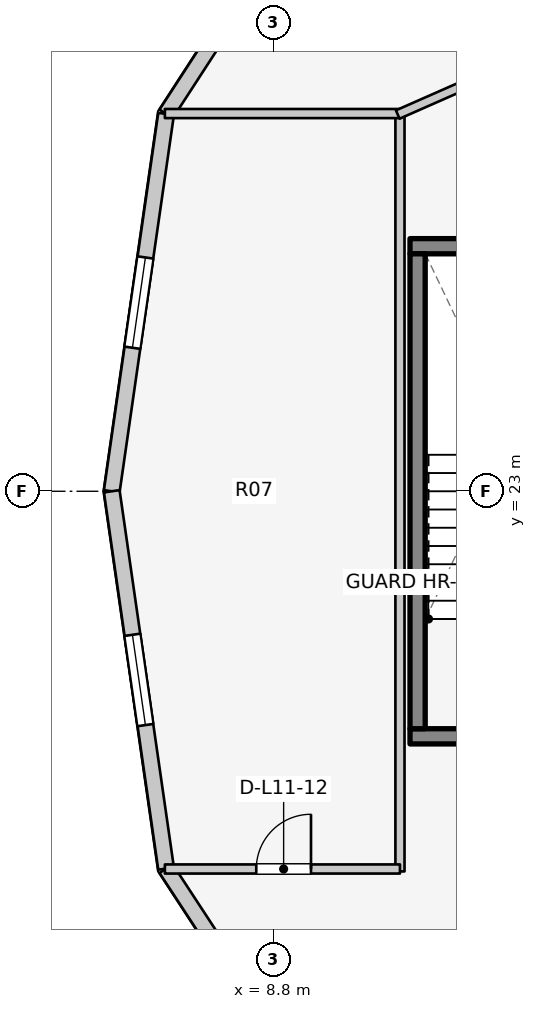
"""IFC4 building model, lengths in metres.
Left out: names, types, materials, properties, quantities, classifications, styles, units other than length and angle.
Written with IfcOpenShell. Run it as: python <this file> out.ifc"""

import sys

from ifc_helpers import new_model, si_unit, direction, frame, frame_2d, origin, place, context, subcontext, project, spatial, rectangle, extrude, element, fill, save


model = new_model("IFC4")
c1 = context("Model", 3, precision=1e-05, world=origin(), true_north=direction((0.0, 1.0)))
c2 = subcontext(c1, "Body", "Model", "MODEL_VIEW")
j1 = project(units=[si_unit("LENGTHUNIT", "METRE"), si_unit("PLANEANGLEUNIT", "RADIAN")], contexts=[c1])
p1 = place(None, origin())
s1 = spatial("IfcSite", under=j1, at=p1, CompositionType="ELEMENT")
p2 = place(p1, origin())
s2 = spatial("IfcBuilding", under=s1, at=p2, CompositionType="ELEMENT")
p3 = place(p2, frame((0.0, 0.0, 40.0)))
s3 = spatial("IfcBuildingStorey", under=s2, at=p3, CompositionType="ELEMENT", Elevation=40.0)
p4 = place(p3, frame((11.045, 18.97, 0.0), z_axis=(0.0, 0.0, 1.0), x_axis=(1.0, 0.0, 0.0)))
e1 = element("IfcWall", 1, at=p4, inside=s3, PredefinedType="SOLIDWALL", context=c2, shape_type="SweptSolid", body=[
    extrude(rectangle(XDim=3.782, YDim=0.25, at=frame_2d((1.891, 0.0))), origin(), (0.0, 0.0, 1.0), 3.1),
])
p5 = place(p4, frame((1.135, 0.0, 0.0)))
e2 = element("IfcOpeningElement", 2, at=p5, cuts=e1, PredefinedType="OPENING", context=c2, shape_type="SweptSolid", body=[
    extrude(rectangle(XDim=1.1, YDim=2.1, at=frame_2d((0.55, 1.05))), frame((0.0, 0.135, 0.0), z_axis=(0.0, -1.0, 0.0), x_axis=(1.0, 0.0, 0.0)), (0.0, 0.0, 1.0), 0.27),
])
p6 = place(p3, frame((11.045, 27.03, 0.0), z_axis=(0.0, 0.0, 1.0), x_axis=(1.0, 0.0, 0.0)))
e3 = element("IfcWall", 3, at=p6, inside=s3, PredefinedType="SOLIDWALL", context=c2, shape_type="SweptSolid", body=[
    extrude(rectangle(XDim=3.782, YDim=0.25, at=frame_2d((1.891, 0.0))), origin(), (0.0, 0.0, 1.0), 3.1),
])
p7 = place(p3, frame((11.17, 19.095, 0.0), z_axis=(0.0, 0.0, 1.0), x_axis=(0.0, 1.0, 0.0)))
e4 = element("IfcWall", 4, at=p7, inside=s3, PredefinedType="SOLIDWALL", context=c2, shape_type="SweptSolid", body=[
    extrude(rectangle(XDim=7.81, YDim=0.25, at=frame_2d((3.905, 0.0))), origin(), (0.0, 0.0, 1.0), 3.1),
])
p8 = place(p3, frame((9.806, 33.476, 0.0), z_axis=(0.0, 0.0, 1.0), x_axis=(-0.544578722263, -0.838709732421, 0.0)))
e5 = element("IfcWall", 5, at=p8, inside=s3, PredefinedType="STANDARD", context=c2, shape_type="SweptSolid", body=[
    extrude(rectangle(XDim=5.092, YDim=0.26, at=frame_2d((2.546, 0.0))), origin(), (0.0, 0.0, 1.0), 2.85),
])
p9 = place(p8, frame((1.346, 0.0, 0.75)))
e6 = element("IfcOpeningElement", 6, at=p9, cuts=e5, PredefinedType="OPENING", context=c2, shape_type="SweptSolid", body=[
    extrude(rectangle(XDim=2.4, YDim=1.7, at=frame_2d((1.2, 0.85))), frame((0.0, 0.14, 0.0), z_axis=(0.0, -1.0, 0.0), x_axis=(1.0, 0.0, 0.0)), (0.0, 0.0, 1.0), 0.28),
])
p10 = place(p3, frame((7.033, 29.205, 0.0), z_axis=(0.0, 0.0, 1.0), x_axis=(-0.142528001686, -0.989790770181, 0.0)))
e7 = element("IfcWall", 7, at=p10, inside=s3, PredefinedType="STANDARD", context=c2, shape_type="SweptSolid", body=[
    extrude(rectangle(XDim=6.269, YDim=0.26, at=frame_2d((3.135, 0.0))), origin(), (0.0, 0.0, 1.0), 2.85),
])
p11 = place(p10, frame((2.385, 0.0, 0.75)))
e8 = element("IfcOpeningElement", 8, at=p11, cuts=e7, PredefinedType="OPENING", context=c2, shape_type="SweptSolid", body=[
    extrude(rectangle(XDim=1.5, YDim=1.6, at=frame_2d((0.75, 0.8))), frame((0.0, 0.14, 0.0), z_axis=(0.0, -1.0, 0.0), x_axis=(1.0, 0.0, 0.0)), (0.0, 0.0, 1.0), 0.28),
])
p12 = place(p3, frame((6.14, 23.0, 0.0), z_axis=(0.0, 0.0, 1.0), x_axis=(0.142528001686, -0.989790770181, 0.0)))
e9 = element("IfcWall", 9, at=p12, inside=s3, PredefinedType="STANDARD", context=c2, shape_type="SweptSolid", body=[
    extrude(rectangle(XDim=6.269, YDim=0.26, at=frame_2d((3.135, 0.0))), origin(), (0.0, 0.0, 1.0), 2.85),
])
p13 = place(p12, frame((2.385, 0.0, 0.75)))
e10 = element("IfcOpeningElement", 10, at=p13, cuts=e9, PredefinedType="OPENING", context=c2, shape_type="SweptSolid", body=[
    extrude(rectangle(XDim=1.5, YDim=1.6, at=frame_2d((0.75, 0.8))), frame((0.0, 0.14, 0.0), z_axis=(0.0, -1.0, 0.0), x_axis=(1.0, 0.0, 0.0)), (0.0, 0.0, 1.0), 0.28),
])
p14 = place(p3, frame((7.033, 16.795, 0.0), z_axis=(0.0, 0.0, 1.0), x_axis=(0.547702757047, -0.836672988642, 0.0)))
e11 = element("IfcWall", 11, at=p14, inside=s3, PredefinedType="STANDARD", context=c2, shape_type="SweptSolid", body=[
    extrude(rectangle(XDim=5.062, YDim=0.26, at=frame_2d((2.531, 0.0))), origin(), (0.0, 0.0, 1.0), 2.85),
])
p15 = place(p14, frame((1.331, 0.0, 0.75)))
e12 = element("IfcOpeningElement", 12, at=p15, cuts=e11, PredefinedType="OPENING", context=c2, shape_type="SweptSolid", body=[
    extrude(rectangle(XDim=2.4, YDim=1.7, at=frame_2d((1.2, 0.85))), frame((0.0, 0.14, 0.0), z_axis=(0.0, -1.0, 0.0), x_axis=(1.0, 0.0, 0.0)), (0.0, 0.0, 1.0), 0.28),
])
p16 = place(p3, frame((10.88, 16.748, 0.0), z_axis=(0.0, 0.0, 1.0), x_axis=(0.0, 1.0, 0.0)))
e13 = element("IfcWall", 13, at=p16, inside=s3, PredefinedType="PARTITIONING", context=c2, shape_type="SweptSolid", body=[
    extrude(rectangle(XDim=12.503, YDim=0.15, at=frame_2d((6.252, 0.0))), origin(), (0.0, 0.0, 1.0), 2.12),
])
p17 = place(p3, frame((7.014, 16.788, 0.0), z_axis=(0.0, 0.0, 1.0), x_axis=(1.0, 0.0, 0.0)))
e14 = element("IfcWall", 14, at=p17, inside=s3, PredefinedType="PARTITIONING", context=c2, shape_type="SweptSolid", body=[
    extrude(rectangle(XDim=3.866, YDim=0.15, at=frame_2d((1.933, 0.0))), origin(), (0.0, 0.0, 1.0), 2.855),
])
p18 = place(p17, frame((1.503, 0.0, 0.0)))
e15 = element("IfcOpeningElement", 15, at=p18, cuts=e14, PredefinedType="OPENING", context=c2, shape_type="SweptSolid", body=[
    extrude(rectangle(XDim=0.9, YDim=2.1, at=frame_2d((0.45, 1.05))), frame((0.0, 0.085, 0.0), z_axis=(0.0, -1.0, 0.0), x_axis=(1.0, 0.0, 0.0)), (0.0, 0.0, 1.0), 0.17),
])
p19 = place(p3, frame((7.014, 29.212, 0.0), z_axis=(0.0, 0.0, 1.0), x_axis=(1.0, 0.0, 0.0)))
e16 = element("IfcWall", 16, at=p19, inside=s3, PredefinedType="PARTITIONING", context=c2, shape_type="SweptSolid", body=[
    extrude(rectangle(XDim=3.866, YDim=0.15, at=frame_2d((1.933, 0.0))), origin(), (0.0, 0.0, 1.0), 2.855),
])
p20 = place(p3, frame((10.844, 29.196, 0.0), z_axis=(0.0, 0.0, 1.0), x_axis=(0.91502756289, 0.403391322604, 0.0)))
e17 = element("IfcWall", 17, at=p20, inside=s3, PredefinedType="PARTITIONING", context=c2, shape_type="SweptSolid", body=[
    extrude(rectangle(XDim=4.637, YDim=0.15, at=frame_2d((2.319, 0.0))), origin(), (0.0, 0.0, 1.0), 2.069),
])
p21 = place(p11, origin())
e18 = element("IfcWindow", 18, at=p21, inside=s3, PartitioningType="SINGLE_PANEL", PredefinedType="WINDOW", context=c2, shape_type="SweptSolid", body=[
    extrude(rectangle(XDim=1.5, YDim=1.6, at=frame_2d((0.75, 0.8))), frame((0.0, 0.03, 0.0), z_axis=(0.0, -1.0, 0.0), x_axis=(1.0, 0.0, 0.0)), (0.0, 0.0, 1.0), 0.06),
])
fill(e8, e18)
p22 = place(p13, origin())
e19 = element("IfcWindow", 19, at=p22, inside=s3, PartitioningType="SINGLE_PANEL", PredefinedType="WINDOW", context=c2, shape_type="SweptSolid", body=[
    extrude(rectangle(XDim=1.5, YDim=1.6, at=frame_2d((0.75, 0.8))), frame((0.0, 0.03, 0.0), z_axis=(0.0, -1.0, 0.0), x_axis=(1.0, 0.0, 0.0)), (0.0, 0.0, 1.0), 0.06),
])
fill(e10, e19)
p23 = place(p18, origin())
e20 = element("IfcDoor", 20, at=p23, inside=s3, OperationType="SINGLE_SWING_RIGHT", PredefinedType="DOOR", context=c2, shape_type="SweptSolid", body=[
    extrude(rectangle(XDim=0.9, YDim=2.1, at=frame_2d((0.45, 1.05))), frame((0.0, 0.025, 0.0), z_axis=(0.0, -1.0, 0.0), x_axis=(1.0, 0.0, 0.0)), (0.0, 0.0, 1.0), 0.05),
])
fill(e15, e20)
save(model, sys.argv[1])
